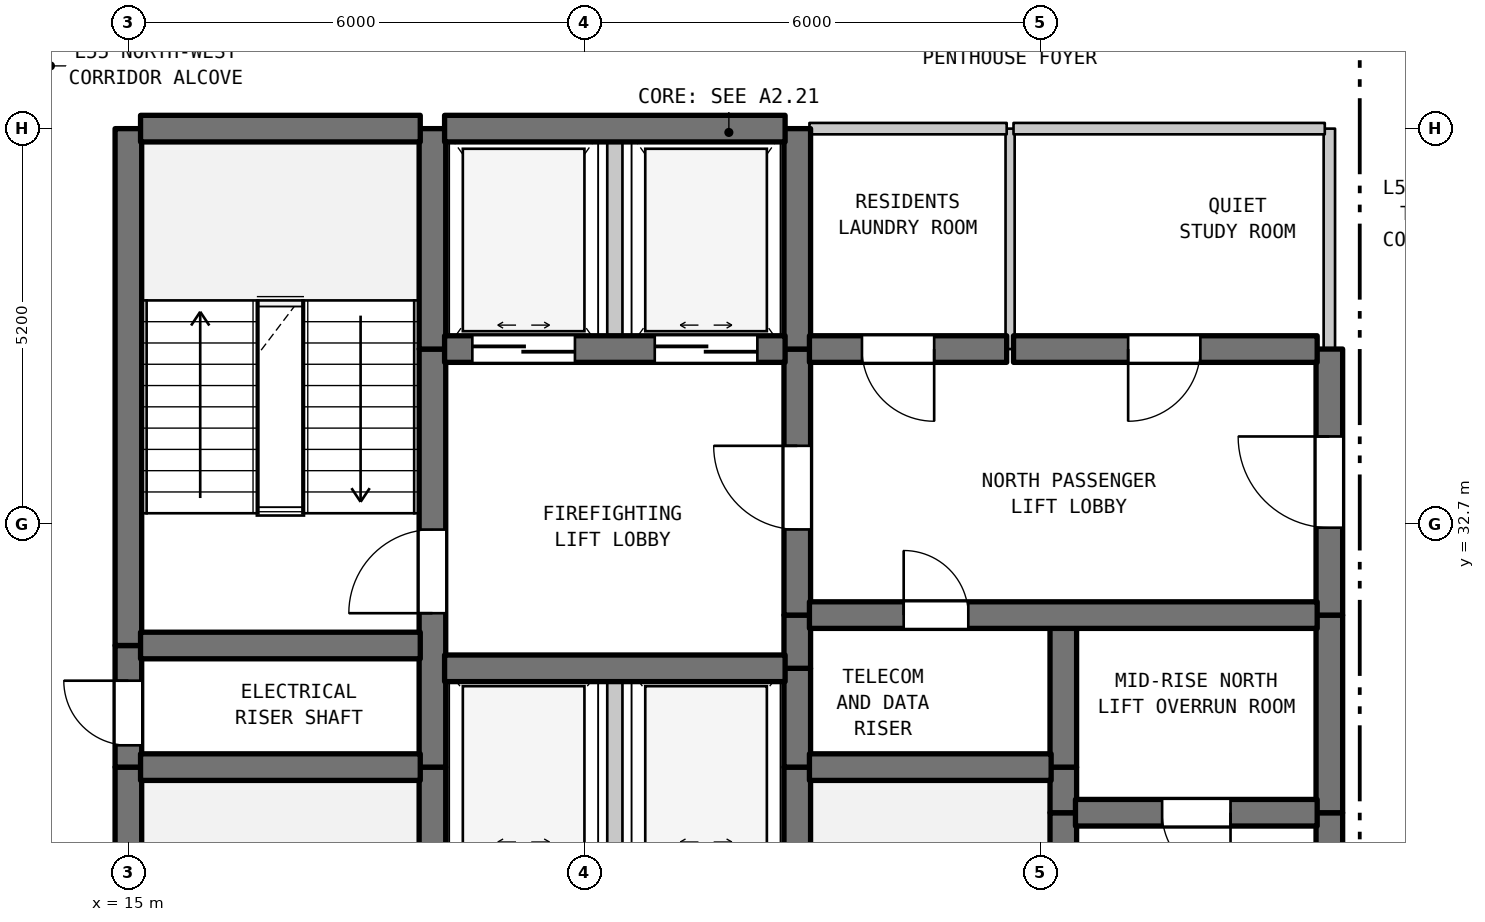
"""IFC4 building model, lengths in metres.
Left out: names, types, materials, properties, quantities, classifications, styles, units other than length and angle.
Written with IfcOpenShell. Run it as: python <this file> out.ifc"""

import sys

from ifc_helpers import new_model, si_unit, direction, frame, frame_2d, origin, place, context, subcontext, project, spatial, rectangle, extrude, element, fill, save


model = new_model("IFC4")
c1 = context("Model", 3, precision=1e-05, world=origin(), true_north=direction((0.0, 1.0)))
c2 = subcontext(c1, "Body", "Model", "MODEL_VIEW")
j1 = project(units=[si_unit("LENGTHUNIT", "METRE"), si_unit("PLANEANGLEUNIT", "RADIAN")], contexts=[c1])
p1 = place(None, origin())
s1 = spatial("IfcSite", under=j1, at=p1, CompositionType="ELEMENT")
p2 = place(p1, origin())
s2 = spatial("IfcBuilding", under=s1, at=p2, CompositionType="ELEMENT")
p3 = place(p2, frame((0.0, 0.0, 222.8)))
s3 = spatial("IfcBuildingStorey", under=s2, at=p3, CompositionType="ELEMENT", Elevation=222.8)
p4 = place(p3, frame((15.0, 22.7, 0.0), z_axis=(0.0, 0.0, 1.0), x_axis=(0.0, 1.0, 0.0)))
e1 = element("IfcWall", 1, at=p4, inside=s3, PredefinedType="SHEAR", context=c2, shape_type="SweptSolid", body=[
    extrude(rectangle(XDim=6.8, YDim=0.35, at=frame_2d((3.4, 0.0))), origin(), (0.0, 0.0, 1.0), 3.39),
])
p5 = place(p3, frame((15.0, 29.5, 0.0), z_axis=(0.0, 0.0, 1.0), x_axis=(0.0, 1.0, 0.0)))
e2 = element("IfcWall", 2, at=p5, inside=s3, PredefinedType="SHEAR", context=c2, shape_type="SweptSolid", body=[
    extrude(rectangle(XDim=1.6, YDim=0.35, at=frame_2d((0.8, 0.0))), origin(), (0.0, 0.0, 1.0), 3.39),
])
p6 = place(p5, frame((0.287, 0.0, 0.0)))
e3 = element("IfcOpeningElement", 3, at=p6, cuts=e2, PredefinedType="OPENING", context=c2, shape_type="SweptSolid", body=[
    extrude(rectangle(XDim=0.85, YDim=2.1, at=frame_2d((0.425, 1.05))), frame((0.0, 0.185, 0.0), z_axis=(0.0, -1.0, 0.0), x_axis=(1.0, 0.0, 0.0)), (0.0, 0.0, 1.0), 0.37),
])
p7 = place(p3, frame((15.0, 31.1, 0.0), z_axis=(0.0, 0.0, 1.0), x_axis=(0.0, 1.0, 0.0)))
e4 = element("IfcWall", 4, at=p7, inside=s3, PredefinedType="SHEAR", context=c2, shape_type="SweptSolid", body=[
    extrude(rectangle(XDim=6.8, YDim=0.35, at=frame_2d((3.4, 0.0))), origin(), (0.0, 0.0, 1.0), 3.39),
])
p8 = place(p3, frame((19.0, 28.2, 0.0), z_axis=(0.0, 0.0, 1.0), x_axis=(0.0, 1.0, 0.0)))
e5 = element("IfcWall", 5, at=p8, inside=s3, PredefinedType="SHEAR", context=c2, shape_type="SweptSolid", body=[
    extrude(rectangle(XDim=1.3, YDim=0.35, at=frame_2d((0.65, 0.0))), origin(), (0.0, 0.0, 1.0), 3.39),
])
p9 = place(p3, frame((19.0, 29.5, 0.0), z_axis=(0.0, 0.0, 1.0), x_axis=(0.0, 1.0, 0.0)))
e6 = element("IfcWall", 6, at=p9, inside=s3, PredefinedType="SHEAR", context=c2, shape_type="SweptSolid", body=[
    extrude(rectangle(XDim=5.5, YDim=0.35, at=frame_2d((2.75, 0.0))), origin(), (0.0, 0.0, 1.0), 3.39),
])
p10 = place(p9, frame((2.025, 0.0, 0.0)))
e7 = element("IfcOpeningElement", 7, at=p10, cuts=e6, PredefinedType="OPENING", context=c2, shape_type="SweptSolid", body=[
    extrude(rectangle(XDim=1.1, YDim=2.15, at=frame_2d((0.55, 1.075))), frame((0.0, 0.185, 0.0), z_axis=(0.0, -1.0, 0.0), x_axis=(1.0, 0.0, 0.0)), (0.0, 0.0, 1.0), 0.37),
])
p11 = place(p3, frame((19.0, 35.0, 0.0), z_axis=(0.0, 0.0, 1.0), x_axis=(0.0, 1.0, 0.0)))
e8 = element("IfcWall", 8, at=p11, inside=s3, PredefinedType="SHEAR", context=c2, shape_type="SweptSolid", body=[
    extrude(rectangle(XDim=2.9, YDim=0.35, at=frame_2d((1.45, 0.0))), origin(), (0.0, 0.0, 1.0), 3.39),
])
p12 = place(p3, frame((21.4, 28.2, 0.0), z_axis=(0.0, 0.0, 1.0), x_axis=(0.0, 1.0, 0.0)))
e9 = element("IfcWall", 9, at=p12, inside=s3, PredefinedType="STANDARD", context=c2, shape_type="SweptSolid", body=[
    extrude(rectangle(XDim=2.6, YDim=0.2, at=frame_2d((1.3, 0.0))), origin(), (0.0, 0.0, 1.0), 3.39),
])
p13 = place(p3, frame((21.4, 35.0, 0.0), z_axis=(0.0, 0.0, 1.0), x_axis=(0.0, 1.0, 0.0)))
e10 = element("IfcWall", 10, at=p13, inside=s3, PredefinedType="STANDARD", context=c2, shape_type="SweptSolid", body=[
    extrude(rectangle(XDim=2.9, YDim=0.2, at=frame_2d((1.45, 0.0))), origin(), (0.0, 0.0, 1.0), 3.39),
])
for number, where, z_axis, x_axis in (
    (11, (23.8, 28.2, 0.0), (0.0, 0.0, 1.0), (0.0, 1.0, 0.0)),
    (12, (23.8, 29.5, 0.0), (0.0, 0.0, 1.0), (0.0, 1.0, 0.0)),
):
    element("IfcWall", number, at=place(p3, frame(where, z_axis=z_axis, x_axis=x_axis)), inside=s3, PredefinedType="SHEAR", context=c2, shape_type="SweptSolid", body=[
        extrude(rectangle(XDim=1.3, YDim=0.35, at=frame_2d((0.65, 0.0))), origin(), (0.0, 0.0, 1.0), 3.39),
    ])
p14 = place(p3, frame((23.8, 30.8, 0.0), z_axis=(0.0, 0.0, 1.0), x_axis=(0.0, 1.0, 0.0)))
e13 = element("IfcWall", 13, at=p14, inside=s3, PredefinedType="SHEAR", context=c2, shape_type="SweptSolid", body=[
    extrude(rectangle(XDim=0.7, YDim=0.35, at=frame_2d((0.35, 0.0))), origin(), (0.0, 0.0, 1.0), 3.39),
])
p15 = place(p3, frame((23.8, 31.5, 0.0), z_axis=(0.0, 0.0, 1.0), x_axis=(0.0, 1.0, 0.0)))
e14 = element("IfcWall", 14, at=p15, inside=s3, PredefinedType="SHEAR", context=c2, shape_type="SweptSolid", body=[
    extrude(rectangle(XDim=3.5, YDim=0.35, at=frame_2d((1.75, 0.0))), origin(), (0.0, 0.0, 1.0), 3.39),
])
p16 = place(p15, frame((1.127, 0.0, 0.0)))
e15 = element("IfcOpeningElement", 15, at=p16, cuts=e14, PredefinedType="OPENING", context=c2, shape_type="SweptSolid", body=[
    extrude(rectangle(XDim=1.1, YDim=2.15, at=frame_2d((0.55, 1.075))), frame((0.0, 0.185, 0.0), z_axis=(0.0, -1.0, 0.0), x_axis=(1.0, 0.0, 0.0)), (0.0, 0.0, 1.0), 0.37),
])
p17 = place(p3, frame((23.8, 35.0, 0.0), z_axis=(0.0, 0.0, 1.0), x_axis=(0.0, 1.0, 0.0)))
e16 = element("IfcWall", 16, at=p17, inside=s3, PredefinedType="SHEAR", context=c2, shape_type="SweptSolid", body=[
    extrude(rectangle(XDim=2.9, YDim=0.35, at=frame_2d((1.45, 0.0))), origin(), (0.0, 0.0, 1.0), 3.39),
])
p18 = place(p3, frame((26.6, 35.0, 0.0), z_axis=(0.0, 0.0, 1.0), x_axis=(0.0, 1.0, 0.0)))
e17 = element("IfcWall", 17, at=p18, inside=s3, PredefinedType="PARTITIONING", context=c2, shape_type="SweptSolid", body=[
    extrude(rectangle(XDim=2.9, YDim=0.12, at=frame_2d((1.45, 0.0))), origin(), (0.0, 0.0, 1.0), 3.39),
])
p19 = place(p3, frame((27.3, 25.6, 0.0), z_axis=(0.0, 0.0, 1.0), x_axis=(0.0, 1.0, 0.0)))
e18 = element("IfcWall", 18, at=p19, inside=s3, PredefinedType="SHEAR", context=c2, shape_type="SweptSolid", body=[
    extrude(rectangle(XDim=3.3, YDim=0.35, at=frame_2d((1.65, 0.0))), origin(), (0.0, 0.0, 1.0), 3.39),
])
p20 = place(p3, frame((27.3, 28.9, 0.0), z_axis=(0.0, 0.0, 1.0), x_axis=(0.0, 1.0, 0.0)))
e19 = element("IfcWall", 19, at=p20, inside=s3, PredefinedType="SHEAR", context=c2, shape_type="SweptSolid", body=[
    extrude(rectangle(XDim=0.6, YDim=0.35, at=frame_2d((0.3, 0.0))), origin(), (0.0, 0.0, 1.0), 3.39),
])
p21 = place(p3, frame((27.3, 29.5, 0.0), z_axis=(0.0, 0.0, 1.0), x_axis=(0.0, 1.0, 0.0)))
e20 = element("IfcWall", 20, at=p21, inside=s3, PredefinedType="SHEAR", context=c2, shape_type="SweptSolid", body=[
    extrude(rectangle(XDim=2.0, YDim=0.35, at=frame_2d((1.0, 0.0))), origin(), (0.0, 0.0, 1.0), 3.39),
])
p22 = place(p3, frame((30.8, 25.6, 0.0), z_axis=(0.0, 0.0, 1.0), x_axis=(0.0, 1.0, 0.0)))
e21 = element("IfcWall", 21, at=p22, inside=s3, PredefinedType="SHEAR", context=c2, shape_type="SweptSolid", body=[
    extrude(rectangle(XDim=3.3, YDim=0.35, at=frame_2d((1.65, 0.0))), origin(), (0.0, 0.0, 1.0), 3.39),
])
p23 = place(p22, frame((0.978, 0.0, 0.0)))
e22 = element("IfcOpeningElement", 22, at=p23, cuts=e21, PredefinedType="OPENING", context=c2, shape_type="SweptSolid", body=[
    extrude(rectangle(XDim=1.2, YDim=2.2, at=frame_2d((0.6, 1.1))), frame((0.0, 0.185, 0.0), z_axis=(0.0, -1.0, 0.0), x_axis=(1.0, 0.0, 0.0)), (0.0, 0.0, 1.0), 0.37),
])
p24 = place(p3, frame((30.8, 28.9, 0.0), z_axis=(0.0, 0.0, 1.0), x_axis=(0.0, 1.0, 0.0)))
e23 = element("IfcWall", 23, at=p24, inside=s3, PredefinedType="SHEAR", context=c2, shape_type="SweptSolid", body=[
    extrude(rectangle(XDim=2.6, YDim=0.35, at=frame_2d((1.3, 0.0))), origin(), (0.0, 0.0, 1.0), 3.39),
])
p25 = place(p3, frame((30.8, 31.5, 0.0), z_axis=(0.0, 0.0, 1.0), x_axis=(0.0, 1.0, 0.0)))
e24 = element("IfcWall", 24, at=p25, inside=s3, PredefinedType="SHEAR", context=c2, shape_type="SweptSolid", body=[
    extrude(rectangle(XDim=3.5, YDim=0.35, at=frame_2d((1.75, 0.0))), origin(), (0.0, 0.0, 1.0), 3.39),
])
p26 = place(p25, frame((1.15, 0.0, 0.0)))
e25 = element("IfcOpeningElement", 25, at=p26, cuts=e24, PredefinedType="OPENING", context=c2, shape_type="SweptSolid", body=[
    extrude(rectangle(XDim=1.2, YDim=2.2, at=frame_2d((0.6, 1.1))), frame((0.0, 0.185, 0.0), z_axis=(0.0, -1.0, 0.0), x_axis=(1.0, 0.0, 0.0)), (0.0, 0.0, 1.0), 0.37),
])
p27 = place(p3, frame((30.8, 35.0, 0.0), z_axis=(0.0, 0.0, 1.0), x_axis=(0.0, 1.0, 0.0)))
e26 = element("IfcWall", 26, at=p27, inside=s3, PredefinedType="STANDARD", context=c2, shape_type="SweptSolid", body=[
    extrude(rectangle(XDim=2.9, YDim=0.15, at=frame_2d((1.45, 0.0))), origin(), (0.0, 0.0, 1.0), 3.39),
])
p28 = place(p3, frame((27.46, 28.9, 0.0), z_axis=(0.0, 0.0, 1.0), x_axis=(1.0, 0.0, 0.0)))
e27 = element("IfcWall", 27, at=p28, inside=s3, PredefinedType="SHEAR", context=c2, shape_type="SweptSolid", body=[
    extrude(rectangle(XDim=3.18, YDim=0.35, at=frame_2d((1.59, 0.0))), origin(), (0.0, 0.0, 1.0), 3.39),
])
p29 = place(p28, frame((1.14, 0.0, 0.0)))
e28 = element("IfcOpeningElement", 28, at=p29, cuts=e27, PredefinedType="OPENING", context=c2, shape_type="SweptSolid", body=[
    extrude(rectangle(XDim=0.9, YDim=2.15, at=frame_2d((0.45, 1.075))), frame((0.0, 0.185, 0.0), z_axis=(0.0, -1.0, 0.0), x_axis=(1.0, 0.0, 0.0)), (0.0, 0.0, 1.0), 0.37),
])
p30 = place(p3, frame((15.16, 29.5, 0.0), z_axis=(0.0, 0.0, 1.0), x_axis=(1.0, 0.0, 0.0)))
e29 = element("IfcWall", 29, at=p30, inside=s3, PredefinedType="SHEAR", context=c2, shape_type="SweptSolid", body=[
    extrude(rectangle(XDim=3.68, YDim=0.35, at=frame_2d((1.84, 0.0))), origin(), (0.0, 0.0, 1.0), 3.39),
])
p31 = place(p3, frame((23.96, 29.5, 0.0), z_axis=(0.0, 0.0, 1.0), x_axis=(1.0, 0.0, 0.0)))
e30 = element("IfcWall", 30, at=p31, inside=s3, PredefinedType="SHEAR", context=c2, shape_type="SweptSolid", body=[
    extrude(rectangle(XDim=3.18, YDim=0.35, at=frame_2d((1.59, 0.0))), origin(), (0.0, 0.0, 1.0), 3.39),
])
p32 = place(p3, frame((19.16, 30.8, 0.0), z_axis=(0.0, 0.0, 1.0), x_axis=(1.0, 0.0, 0.0)))
e31 = element("IfcWall", 31, at=p32, inside=s3, PredefinedType="SHEAR", context=c2, shape_type="SweptSolid", body=[
    extrude(rectangle(XDim=4.48, YDim=0.35, at=frame_2d((2.24, 0.0))), origin(), (0.0, 0.0, 1.0), 3.39),
])
p33 = place(p3, frame((15.16, 31.1, 0.0), z_axis=(0.0, 0.0, 1.0), x_axis=(1.0, 0.0, 0.0)))
e32 = element("IfcWall", 32, at=p33, inside=s3, PredefinedType="SHEAR", context=c2, shape_type="SweptSolid", body=[
    extrude(rectangle(XDim=3.68, YDim=0.35, at=frame_2d((1.84, 0.0))), origin(), (0.0, 0.0, 1.0), 3.39),
])
p34 = place(p3, frame((23.96, 31.5, 0.0), z_axis=(0.0, 0.0, 1.0), x_axis=(1.0, 0.0, 0.0)))
e33 = element("IfcWall", 33, at=p34, inside=s3, PredefinedType="SHEAR", context=c2, shape_type="SweptSolid", body=[
    extrude(rectangle(XDim=6.68, YDim=0.35, at=frame_2d((3.34, 0.0))), origin(), (0.0, 0.0, 1.0), 3.39),
])
p35 = place(p34, frame((1.24, 0.0, 0.0)))
e34 = element("IfcOpeningElement", 34, at=p35, cuts=e33, PredefinedType="OPENING", context=c2, shape_type="SweptSolid", body=[
    extrude(rectangle(XDim=0.85, YDim=2.1, at=frame_2d((0.425, 1.05))), frame((0.0, 0.185, 0.0), z_axis=(0.0, -1.0, 0.0), x_axis=(1.0, 0.0, 0.0)), (0.0, 0.0, 1.0), 0.37),
])
p36 = place(p3, frame((19.16, 35.0, 0.0), z_axis=(0.0, 0.0, 1.0), x_axis=(1.0, 0.0, 0.0)))
e35 = element("IfcWall", 35, at=p36, inside=s3, PredefinedType="SHEAR", context=c2, shape_type="SweptSolid", body=[
    extrude(rectangle(XDim=4.48, YDim=0.35, at=frame_2d((2.24, 0.0))), origin(), (0.0, 0.0, 1.0), 3.39),
])
p37 = place(p36, frame((0.365, 0.0, 0.0)))
e36 = element("IfcOpeningElement", 36, at=p37, cuts=e35, PredefinedType="OPENING", context=c2, shape_type="SweptSolid", body=[
    extrude(rectangle(XDim=1.35, YDim=2.2, at=frame_2d((0.675, 1.1))), frame((0.0, 0.185, 0.0), z_axis=(0.0, -1.0, 0.0), x_axis=(1.0, 0.0, 0.0)), (0.0, 0.0, 1.0), 0.37),
])
p38 = place(p36, frame((2.765, 0.0, 0.0)))
e37 = element("IfcOpeningElement", 37, at=p38, cuts=e35, PredefinedType="OPENING", context=c2, shape_type="SweptSolid", body=[
    extrude(rectangle(XDim=1.35, YDim=2.2, at=frame_2d((0.675, 1.1))), frame((0.0, 0.185, 0.0), z_axis=(0.0, -1.0, 0.0), x_axis=(1.0, 0.0, 0.0)), (0.0, 0.0, 1.0), 0.37),
])
p39 = place(p3, frame((23.96, 35.0, 0.0), z_axis=(0.0, 0.0, 1.0), x_axis=(1.0, 0.0, 0.0)))
e38 = element("IfcWall", 38, at=p39, inside=s3, PredefinedType="SHEAR", context=c2, shape_type="SweptSolid", body=[
    extrude(rectangle(XDim=2.595, YDim=0.35, at=frame_2d((1.297, 0.0))), origin(), (0.0, 0.0, 1.0), 3.39),
])
p40 = place(p39, frame((0.691, 0.0, 0.0)))
e39 = element("IfcOpeningElement", 39, at=p40, cuts=e38, PredefinedType="OPENING", context=c2, shape_type="SweptSolid", body=[
    extrude(rectangle(XDim=0.95, YDim=2.15, at=frame_2d((0.475, 1.075))), frame((0.0, 0.185, 0.0), z_axis=(0.0, -1.0, 0.0), x_axis=(1.0, 0.0, 0.0)), (0.0, 0.0, 1.0), 0.37),
])
p41 = place(p3, frame((26.645, 35.0, 0.0), z_axis=(0.0, 0.0, 1.0), x_axis=(1.0, 0.0, 0.0)))
e40 = element("IfcWall", 40, at=p41, inside=s3, PredefinedType="SHEAR", context=c2, shape_type="SweptSolid", body=[
    extrude(rectangle(XDim=3.995, YDim=0.35, at=frame_2d((1.998, 0.0))), origin(), (0.0, 0.0, 1.0), 3.39),
])
p42 = place(p41, frame((1.508, 0.0, 0.0)))
e41 = element("IfcOpeningElement", 41, at=p42, cuts=e40, PredefinedType="OPENING", context=c2, shape_type="SweptSolid", body=[
    extrude(rectangle(XDim=0.95, YDim=2.15, at=frame_2d((0.475, 1.075))), frame((0.0, 0.185, 0.0), z_axis=(0.0, -1.0, 0.0), x_axis=(1.0, 0.0, 0.0)), (0.0, 0.0, 1.0), 0.37),
])
p43 = place(p3, frame((15.16, 37.9, 0.0), z_axis=(0.0, 0.0, 1.0), x_axis=(1.0, 0.0, 0.0)))
e42 = element("IfcWall", 42, at=p43, inside=s3, PredefinedType="SHEAR", context=c2, shape_type="SweptSolid", body=[
    extrude(rectangle(XDim=3.68, YDim=0.35, at=frame_2d((1.84, 0.0))), origin(), (0.0, 0.0, 1.0), 3.39),
])
p44 = place(p3, frame((19.16, 37.9, 0.0), z_axis=(0.0, 0.0, 1.0), x_axis=(1.0, 0.0, 0.0)))
e43 = element("IfcWall", 43, at=p44, inside=s3, PredefinedType="SHEAR", context=c2, shape_type="SweptSolid", body=[
    extrude(rectangle(XDim=4.48, YDim=0.35, at=frame_2d((2.24, 0.0))), origin(), (0.0, 0.0, 1.0), 3.39),
])
p45 = place(p3, frame((23.96, 37.9, 0.0), z_axis=(0.0, 0.0, 1.0), x_axis=(1.0, 0.0, 0.0)))
e44 = element("IfcWall", 44, at=p45, inside=s3, PredefinedType="STANDARD", context=c2, shape_type="SweptSolid", body=[
    extrude(rectangle(XDim=2.595, YDim=0.15, at=frame_2d((1.297, 0.0))), origin(), (0.0, 0.0, 1.0), 2.89),
])
p46 = place(p3, frame((26.645, 37.9, 0.0), z_axis=(0.0, 0.0, 1.0), x_axis=(1.0, 0.0, 0.0)))
e45 = element("IfcWall", 45, at=p46, inside=s3, PredefinedType="STANDARD", context=c2, shape_type="SweptSolid", body=[
    extrude(rectangle(XDim=4.095, YDim=0.15, at=frame_2d((2.047, 0.0))), origin(), (0.0, 0.0, 1.0), 2.89),
])
p47 = place(p6, origin())
e46 = element("IfcDoor", 46, at=p47, inside=s3, OperationType="SINGLE_SWING_RIGHT", PredefinedType="DOOR", context=c2, shape_type="SweptSolid", body=[
    extrude(rectangle(XDim=0.85, YDim=2.1, at=frame_2d((0.425, 1.05))), frame((0.0, 0.025, 0.0), z_axis=(0.0, -1.0, 0.0), x_axis=(1.0, 0.0, 0.0)), (0.0, 0.0, 1.0), 0.05),
])
fill(e3, e46)
p48 = place(p10, origin())
e47 = element("IfcDoor", 47, at=p48, inside=s3, OperationType="SINGLE_SWING_LEFT", PredefinedType="DOOR", context=c2, shape_type="SweptSolid", body=[
    extrude(rectangle(XDim=1.1, YDim=2.15, at=frame_2d((0.55, 1.075))), frame((0.0, 0.025, 0.0), z_axis=(0.0, -1.0, 0.0), x_axis=(1.0, 0.0, 0.0)), (0.0, 0.0, 1.0), 0.05),
])
fill(e7, e47)
p49 = place(p16, origin())
e48 = element("IfcDoor", 48, at=p49, inside=s3, OperationType="SINGLE_SWING_RIGHT", PredefinedType="DOOR", context=c2, shape_type="SweptSolid", body=[
    extrude(rectangle(XDim=1.1, YDim=2.15, at=frame_2d((0.55, 1.075))), frame((0.0, 0.025, 0.0), z_axis=(0.0, -1.0, 0.0), x_axis=(1.0, 0.0, 0.0)), (0.0, 0.0, 1.0), 0.05),
])
fill(e15, e48)
p50 = place(p26, origin())
e49 = element("IfcDoor", 49, at=p50, inside=s3, OperationType="SINGLE_SWING_RIGHT", PredefinedType="DOOR", context=c2, shape_type="SweptSolid", body=[
    extrude(rectangle(XDim=1.2, YDim=2.2, at=frame_2d((0.6, 1.1))), frame((0.0, 0.025, 0.0), z_axis=(0.0, -1.0, 0.0), x_axis=(1.0, 0.0, 0.0)), (0.0, 0.0, 1.0), 0.05),
])
fill(e25, e49)
p51 = place(p29, frame((0.9, 0.0, 0.0), z_axis=(0.0, 0.0, 1.0), x_axis=(-1.0, 0.0, 0.0)))
e50 = element("IfcDoor", 50, at=p51, inside=s3, OperationType="SINGLE_SWING_RIGHT", PredefinedType="DOOR", context=c2, shape_type="SweptSolid", body=[
    extrude(rectangle(XDim=0.9, YDim=2.15, at=frame_2d((0.45, 1.075))), frame((0.0, 0.025, 0.0), z_axis=(0.0, -1.0, 0.0), x_axis=(1.0, 0.0, 0.0)), (0.0, 0.0, 1.0), 0.05),
])
fill(e28, e50)
p52 = place(p35, origin())
e51 = element("IfcDoor", 51, at=p52, inside=s3, OperationType="SINGLE_SWING_LEFT", PredefinedType="DOOR", context=c2, shape_type="SweptSolid", body=[
    extrude(rectangle(XDim=0.85, YDim=2.1, at=frame_2d((0.425, 1.05))), frame((0.0, 0.025, 0.0), z_axis=(0.0, -1.0, 0.0), x_axis=(1.0, 0.0, 0.0)), (0.0, 0.0, 1.0), 0.05),
])
fill(e34, e51)
p53 = place(p37, origin())
e52 = element("IfcDoor", 52, at=p53, inside=s3, OperationType="DOUBLE_DOOR_SLIDING", PredefinedType="DOOR", context=c2, shape_type="SweptSolid", body=[
    extrude(rectangle(XDim=1.35, YDim=2.2, at=frame_2d((0.675, 1.1))), frame((0.0, 0.025, 0.0), z_axis=(0.0, -1.0, 0.0), x_axis=(1.0, 0.0, 0.0)), (0.0, 0.0, 1.0), 0.05),
])
fill(e36, e52)
p54 = place(p38, origin())
e53 = element("IfcDoor", 53, at=p54, inside=s3, OperationType="DOUBLE_DOOR_SLIDING", PredefinedType="DOOR", context=c2, shape_type="SweptSolid", body=[
    extrude(rectangle(XDim=1.35, YDim=2.2, at=frame_2d((0.675, 1.1))), frame((0.0, 0.025, 0.0), z_axis=(0.0, -1.0, 0.0), x_axis=(1.0, 0.0, 0.0)), (0.0, 0.0, 1.0), 0.05),
])
fill(e37, e53)
p55 = place(p40, frame((0.95, 0.0, 0.0), z_axis=(0.0, 0.0, 1.0), x_axis=(-1.0, 0.0, 0.0)))
e54 = element("IfcDoor", 54, at=p55, inside=s3, OperationType="SINGLE_SWING_RIGHT", PredefinedType="DOOR", context=c2, shape_type="SweptSolid", body=[
    extrude(rectangle(XDim=0.95, YDim=2.15, at=frame_2d((0.475, 1.075))), frame((0.0, 0.025, 0.0), z_axis=(0.0, -1.0, 0.0), x_axis=(1.0, 0.0, 0.0)), (0.0, 0.0, 1.0), 0.05),
])
fill(e39, e54)
p56 = place(p42, frame((0.95, 0.0, 0.0), z_axis=(0.0, 0.0, 1.0), x_axis=(-1.0, 0.0, 0.0)))
e55 = element("IfcDoor", 55, at=p56, inside=s3, OperationType="SINGLE_SWING_LEFT", PredefinedType="DOOR", context=c2, shape_type="SweptSolid", body=[
    extrude(rectangle(XDim=0.95, YDim=2.15, at=frame_2d((0.475, 1.075))), frame((0.0, 0.025, 0.0), z_axis=(0.0, -1.0, 0.0), x_axis=(1.0, 0.0, 0.0)), (0.0, 0.0, 1.0), 0.05),
])
fill(e41, e55)
save(model, sys.argv[1])
